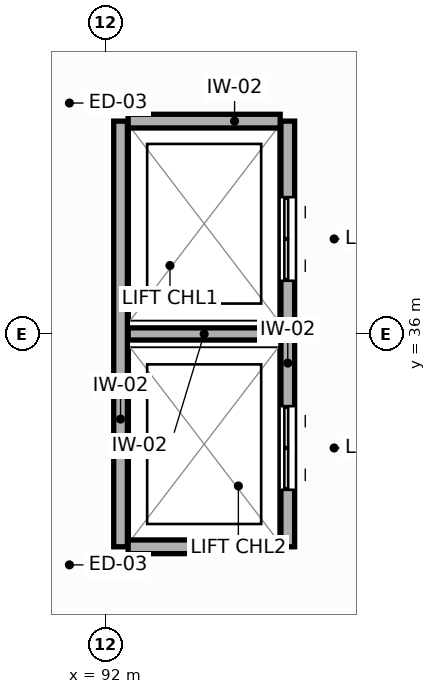
"""IFC4 building model, lengths in metres.
Left out: names, types, materials, properties, quantities, classifications, styles, units other than length and angle.
Written with IfcOpenShell. Run it as: python <this file> out.ifc"""

import sys

from ifc_helpers import new_model, si_unit, direction, frame, frame_2d, origin, place, context, subcontext, project, spatial, rectangle, extrude, element, fill, save


model = new_model("IFC4")
c1 = context("Model", 3, precision=1e-05, world=origin(), true_north=direction((0.0, 1.0)))
c2 = subcontext(c1, "Body", "Model", "MODEL_VIEW")
j1 = project(units=[si_unit("LENGTHUNIT", "METRE"), si_unit("PLANEANGLEUNIT", "RADIAN")], contexts=[c1])
p1 = place(None, origin())
s1 = spatial("IfcSite", under=j1, at=p1, CompositionType="ELEMENT")
p2 = place(p1, origin())
s2 = spatial("IfcBuilding", under=s1, at=p2, CompositionType="ELEMENT")
p3 = place(p2, frame((0.0, 0.0, 4.8)))
s3 = spatial("IfcBuildingStorey", under=s2, at=p3, CompositionType="ELEMENT", Elevation=4.8)
p4 = place(p3, frame((91.421, 41.887, 0.0), z_axis=(0.0, 0.0, 1.0), x_axis=(-0.19504963768, -0.980793372144, 0.0)))
e1 = element("IfcWall", 1, at=p4, inside=s3, PredefinedType="SOLIDWALL", context=c2, shape_type="SweptSolid", body=[
    extrude(rectangle(XDim=5.547, YDim=0.28, at=frame_2d((2.774, 0.0))), origin(), (0.0, 0.0, 1.0), 3.95),
])
p5 = place(p4, frame((1.874, 0.0, 0.0)))
e2 = element("IfcOpeningElement", 2, at=p5, cuts=e1, PredefinedType="OPENING", context=c2, shape_type="SweptSolid", body=[
    extrude(rectangle(XDim=1.8, YDim=2.2, at=frame_2d((0.9, 1.1))), frame((0.0, 0.15, 0.0), z_axis=(0.0, -1.0, 0.0), x_axis=(1.0, 0.0, 0.0)), (0.0, 0.0, 1.0), 0.3),
])
p6 = place(p3, frame((90.339, 35.554, 0.0), z_axis=(0.0, 0.0, 1.0), x_axis=(0.19504963768, -0.980793372144, 0.0)))
e3 = element("IfcWall", 3, at=p6, inside=s3, PredefinedType="SOLIDWALL", context=c2, shape_type="SweptSolid", body=[
    extrude(rectangle(XDim=5.547, YDim=0.28, at=frame_2d((2.774, 0.0))), origin(), (0.0, 0.0, 1.0), 3.95),
])
p7 = place(p6, frame((1.874, 0.0, 0.0)))
e4 = element("IfcOpeningElement", 4, at=p7, cuts=e3, PredefinedType="OPENING", context=c2, shape_type="SweptSolid", body=[
    extrude(rectangle(XDim=1.8, YDim=2.2, at=frame_2d((0.9, 1.1))), frame((0.0, 0.15, 0.0), z_axis=(0.0, -1.0, 0.0), x_axis=(1.0, 0.0, 0.0)), (0.0, 0.0, 1.0), 0.3),
])
p8 = place(p3, frame((94.4, 33.2, 0.0), z_axis=(0.0, 0.0, 1.0), x_axis=(0.0, 1.0, 0.0)))
e5 = element("IfcWall", 5, at=p8, inside=s3, PredefinedType="PARTITIONING", context=c2, shape_type="SweptSolid", body=[
    extrude(rectangle(XDim=5.6, YDim=0.18, at=frame_2d((2.8, 0.0))), origin(), (0.0, 0.0, 1.0), 4.52),
])
p9 = place(p8, frame((3.5, 0.0, 0.0)))
e6 = element("IfcOpeningElement", 6, at=p9, cuts=e5, PredefinedType="OPENING", context=c2, shape_type="SweptSolid", body=[
    extrude(rectangle(XDim=1.1, YDim=2.1, at=frame_2d((0.55, 1.05))), frame((0.0, 0.1, 0.0), z_axis=(0.0, -1.0, 0.0), x_axis=(1.0, 0.0, 0.0)), (0.0, 0.0, 1.0), 0.2),
])
p10 = place(p8, frame((0.75, 0.0, 0.0)))
e7 = element("IfcOpeningElement", 7, at=p10, cuts=e5, PredefinedType="OPENING", context=c2, shape_type="SweptSolid", body=[
    extrude(rectangle(XDim=1.1, YDim=2.1, at=frame_2d((0.55, 1.05))), frame((0.0, 0.1, 0.0), z_axis=(0.0, -1.0, 0.0), x_axis=(1.0, 0.0, 0.0)), (0.0, 0.0, 1.0), 0.2),
])
p11 = place(p3, frame((92.2, 33.2, 0.0), z_axis=(0.0, 0.0, 1.0), x_axis=(0.0, 1.0, 0.0)))
e8 = element("IfcWall", 8, at=p11, inside=s3, PredefinedType="PARTITIONING", context=c2, shape_type="SweptSolid", body=[
    extrude(rectangle(XDim=5.6, YDim=0.18, at=frame_2d((2.8, 0.0))), origin(), (0.0, 0.0, 1.0), 4.52),
])
for number, where, z_axis, x_axis in (
    (9, (92.3, 38.8, 0.0), (0.0, 0.0, 1.0), (1.0, 0.0, 0.0)),
    (10, (92.3, 33.2, 0.0), (0.0, 0.0, 1.0), (1.0, 0.0, 0.0)),
):
    element("IfcWall", number, at=place(p3, frame(where, z_axis=z_axis, x_axis=x_axis)), inside=s3, PredefinedType="PARTITIONING", context=c2, shape_type="SweptSolid", body=[
        extrude(rectangle(XDim=2.0, YDim=0.18, at=frame_2d((1.0, 0.0))), origin(), (0.0, 0.0, 1.0), 4.52),
    ])
p12 = place(p3, frame((92.3, 36.0, 0.0), z_axis=(0.0, 0.0, 1.0), x_axis=(1.0, 0.0, 0.0)))
e11 = element("IfcWall", 11, at=p12, inside=s3, PredefinedType="PARTITIONING", context=c2, shape_type="SweptSolid", body=[
    extrude(rectangle(XDim=2.0, YDim=0.16, at=frame_2d((1.0, 0.0))), origin(), (0.0, 0.0, 1.0), 4.52),
])
p13 = place(p9, origin())
e12 = element("IfcDoor", 12, at=p13, inside=s3, OperationType="DOUBLE_DOOR_SLIDING", PredefinedType="DOOR", context=c2, shape_type="SweptSolid", body=[
    extrude(rectangle(XDim=1.1, YDim=2.1, at=frame_2d((0.55, 1.05))), frame((0.0, 0.025, 0.0), z_axis=(0.0, -1.0, 0.0), x_axis=(1.0, 0.0, 0.0)), (0.0, 0.0, 1.0), 0.05),
])
fill(e6, e12)
p14 = place(p10, origin())
e13 = element("IfcDoor", 13, at=p14, inside=s3, OperationType="DOUBLE_DOOR_SLIDING", PredefinedType="DOOR", context=c2, shape_type="SweptSolid", body=[
    extrude(rectangle(XDim=1.1, YDim=2.1, at=frame_2d((0.55, 1.05))), frame((0.0, 0.025, 0.0), z_axis=(0.0, -1.0, 0.0), x_axis=(1.0, 0.0, 0.0)), (0.0, 0.0, 1.0), 0.05),
])
fill(e7, e13)
save(model, sys.argv[1])
